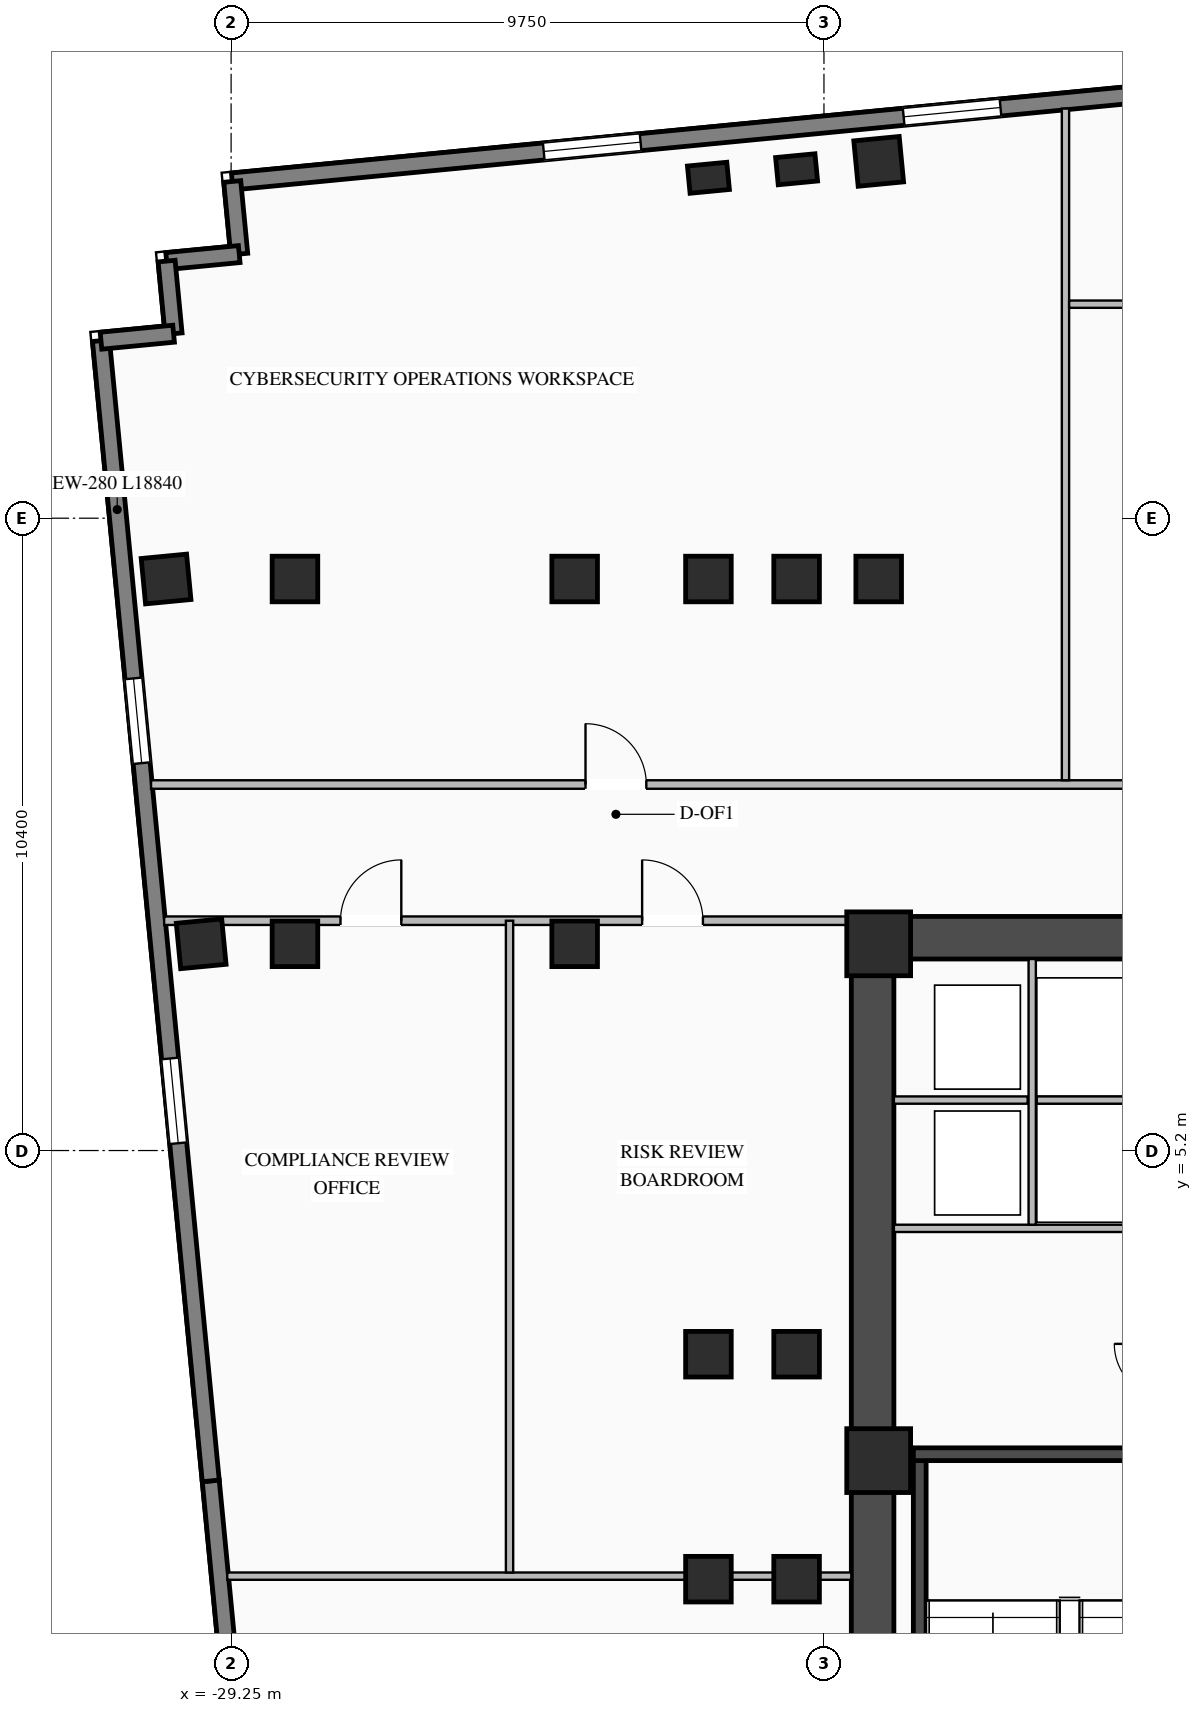
"""IFC4 building model, lengths in metres.
Left out: names, types, materials, properties, quantities, classifications, styles, units other than length and angle.
Written with IfcOpenShell. Run it as: python <this file> out.ifc"""

import sys

from ifc_helpers import new_model, si_unit, direction, frame, frame_2d, origin, origin_2d, place, context, subcontext, project, spatial, rectangle, i_section, extrude, element, fill, save


model = new_model("IFC4")
c1 = context("Model", 3, precision=1e-05, world=origin(), true_north=direction((0.0, 1.0)))
c2 = subcontext(c1, "Body", "Model", "MODEL_VIEW")
j1 = project(units=[si_unit("LENGTHUNIT", "METRE"), si_unit("PLANEANGLEUNIT", "RADIAN")], contexts=[c1])
p1 = place(None, origin())
s1 = spatial("IfcSite", under=j1, at=p1, CompositionType="ELEMENT")
p2 = place(p1, origin())
s2 = spatial("IfcBuilding", under=s1, at=p2, CompositionType="ELEMENT")
p3 = place(p2, frame((0.0, 0.0, 94.9)))
s3 = spatial("IfcBuildingStorey", under=s2, at=p3, CompositionType="ELEMENT", Elevation=94.9)
p4 = place(p3, frame((-19.05, 8.7, 0.0), z_axis=(0.0, 0.0, 1.0), x_axis=(1.0, 0.0, 0.0)))
e1 = element("IfcWall", 1, at=p4, inside=s3, PredefinedType="SHEAR", context=c2, shape_type="SweptSolid", body=[
    extrude(rectangle(XDim=10.25, YDim=0.7, at=frame_2d((5.125, 0.0))), origin(), (0.0, 0.0, 1.0), 3.27),
])
p5 = place(p4, frame((5.6, 0.0, 0.0)))
e2 = element("IfcOpeningElement", 2, at=p5, cuts=e1, PredefinedType="OPENING", context=c2, shape_type="SweptSolid", body=[
    extrude(rectangle(XDim=1.4, YDim=2.05, at=frame_2d((0.7, 1.025))), frame((0.0, 0.36, 0.0), z_axis=(0.0, -1.0, 0.0), x_axis=(1.0, 0.0, 0.0)), (0.0, 0.0, 1.0), 0.72),
])
p6 = place(p3, frame((-18.7, -8.35, 0.0), z_axis=(0.0, 0.0, 1.0), x_axis=(0.0, 1.0, 0.0)))
e3 = element("IfcWall", 3, at=p6, inside=s3, PredefinedType="SHEAR", context=c2, shape_type="SweptSolid", body=[
    extrude(rectangle(XDim=16.7, YDim=0.7, at=frame_2d((8.35, 0.0))), origin(), (0.0, 0.0, 1.0), 3.27),
])
p7 = place(p3, frame((-17.925, -8.1, 0.0), z_axis=(0.0, 0.0, 1.0), x_axis=(0.0, 1.0, 0.0)))
e4 = element("IfcWall", 4, at=p7, inside=s3, PredefinedType="SHEAR", context=c2, shape_type="SweptSolid", body=[
    extrude(rectangle(XDim=8.2, YDim=0.21, at=frame_2d((4.1, 0.0))), origin(), (0.0, 0.0, 1.0), 3.27),
])
p8 = place(p3, frame((-12.89, 0.205, 0.0), z_axis=(0.0, 0.0, 1.0), x_axis=(-1.0, 0.0, 0.0)))
e5 = element("IfcWall", 5, at=p8, inside=s3, PredefinedType="SHEAR", context=c2, shape_type="SweptSolid", body=[
    extrude(rectangle(XDim=5.14, YDim=0.21, at=frame_2d((2.57, 0.0))), origin(), (0.0, 0.0, 1.0), 3.27),
])
for number, where, z_axis, x_axis in (
    (6, (-18.6, 0.1, 0.0), (0.0, 0.0, 1.0), (1.0, 0.0, 0.0)),
    (7, (-18.6, 8.6, 0.0), (0.0, 0.0, 1.0), (1.0, 0.0, 0.0)),
):
    element("IfcColumn", number, at=place(p3, frame(where, z_axis=z_axis, x_axis=x_axis)), inside=s3, PredefinedType="COLUMN", context=c2, shape_type="SweptSolid", body=[
        extrude(rectangle(XDim=1.05, YDim=1.05, at=origin_2d()), origin(), (0.0, 0.0, 1.0), 3.45),
    ])
for number, where, z_axis, x_axis in (
    (8, (-21.4, 14.6, 0.0), (0.0, 0.0, 1.0), (1.0, 0.0, 0.0)),
    (9, (-19.95, 14.6, 0.0), (0.0, 0.0, 1.0), (1.0, 0.0, 0.0)),
    (10, (-18.6, 14.6, 0.0), (0.0, 0.0, 1.0), (1.0, 0.0, 0.0)),
    (11, (-21.4, -1.85, 0.0), (0.0, 0.0, 1.0), (1.0, 0.0, 0.0)),
    (12, (-21.4, 1.85, 0.0), (0.0, 0.0, 1.0), (1.0, 0.0, 0.0)),
    (13, (-19.95, -1.85, 0.0), (0.0, 0.0, 1.0), (1.0, 0.0, 0.0)),
    (14, (-19.95, 1.85, 0.0), (0.0, 0.0, 1.0), (1.0, 0.0, 0.0)),
    (15, (-23.6, 8.6, 0.0), (0.0, 0.0, 1.0), (1.0, 0.0, 0.0)),
    (16, (-23.6, 14.6, 0.0), (0.0, 0.0, 1.0), (1.0, 0.0, 0.0)),
    (17, (-28.2, 8.6, 0.0), (0.0, 0.0, 1.0), (1.0, 0.0, 0.0)),
    (18, (-28.2, 14.6, 0.0), (0.0, 0.0, 1.0), (1.0, 0.0, 0.0)),
    (19, (-18.6, 21.469, 0.0), (0.0, 0.0, 1.0), (0.995, 0.096, 0.0)),
    (20, (-29.742, 8.6, 0.0), (0.0, 0.0, 1.0), (0.995, 0.096, 0.0)),
    (21, (-30.32, 14.6, 0.0), (0.0, 0.0, 1.0), (0.995, 0.096, 0.0)),
):
    element("IfcColumn", number, at=place(p3, frame(where, z_axis=z_axis, x_axis=x_axis)), inside=s3, PredefinedType="COLUMN", context=c2, shape_type="SweptSolid", body=[
        extrude(i_section(OverallWidth=0.75, OverallDepth=0.75, WebThickness=0.03, FlangeThickness=0.044, at=origin_2d()), origin(), (0.0, 0.0, 1.0), 3.45),
    ])
for number, where, z_axis, x_axis in (
    (22, (-21.4, 21.199, 0.0), (0.0, 0.0, 1.0), (0.995, 0.096, 0.0)),
    (23, (-19.95, 21.339, 0.0), (0.0, 0.0, 1.0), (0.995, 0.096, 0.0)),
):
    element("IfcColumn", number, at=place(p3, frame(where, z_axis=z_axis, x_axis=x_axis)), inside=s3, PredefinedType="PILASTER", context=c2, shape_type="SweptSolid", body=[
        extrude(rectangle(XDim=0.65, YDim=0.45, at=origin_2d()), origin(), (0.0, 0.0, 1.0), 3.45),
    ])
p9 = place(p3, frame((-29.231, 21.138, 0.0), z_axis=(0.0, 0.0, 1.0), x_axis=(0.995395780835, 0.095850088663, 0.0)))
e24 = element("IfcWall", 24, at=p9, inside=s3, PredefinedType="STANDARD", context=c2, shape_type="SweptSolid", body=[
    extrude(rectangle(XDim=17.84, YDim=0.28, at=frame_2d((8.92, 0.0))), origin(), (0.0, 0.0, 1.0), 3.25),
])
p10 = place(p9, frame((5.147, 0.0, 0.76)))
e25 = element("IfcOpeningElement", 25, at=p10, cuts=e24, PredefinedType="OPENING", context=c2, shape_type="SweptSolid", body=[
    extrude(rectangle(XDim=1.6, YDim=1.95, at=frame_2d((0.8, 0.975))), frame((0.0, 0.15, 0.0), z_axis=(0.0, -1.0, 0.0), x_axis=(1.0, 0.0, 0.0)), (0.0, 0.0, 1.0), 0.3),
])
p11 = place(p9, frame((11.093, 0.0, 0.76)))
e26 = element("IfcOpeningElement", 26, at=p11, cuts=e24, PredefinedType="OPENING", context=c2, shape_type="SweptSolid", body=[
    extrude(rectangle(XDim=1.6, YDim=1.95, at=frame_2d((0.8, 0.975))), frame((0.0, 0.15, 0.0), z_axis=(0.0, -1.0, 0.0), x_axis=(1.0, 0.0, 0.0)), (0.0, 0.0, 1.0), 0.3),
])
p12 = place(p3, frame((-27.779, -18.987, 0.0), z_axis=(0.0, 0.0, 1.0), x_axis=(-0.095842534142, 0.995396508256, 0.0)))
e27 = element("IfcWall", 27, at=p12, inside=s3, PredefinedType="STANDARD", context=c2, shape_type="SweptSolid", body=[
    extrude(rectangle(XDim=18.84, YDim=0.28, at=frame_2d((9.42, 0.0))), origin(), (0.0, 0.0, 1.0), 3.25),
])
p13 = place(p12, frame((5.58, 0.0, 0.76)))
e28 = element("IfcOpeningElement", 28, at=p13, cuts=e27, PredefinedType="OPENING", context=c2, shape_type="SweptSolid", body=[
    extrude(rectangle(XDim=1.4, YDim=1.95, at=frame_2d((0.7, 0.975))), frame((0.0, 0.15, 0.0), z_axis=(0.0, -1.0, 0.0), x_axis=(1.0, 0.0, 0.0)), (0.0, 0.0, 1.0), 0.3),
])
p14 = place(p12, frame((11.86, 0.0, 0.76)))
e29 = element("IfcOpeningElement", 29, at=p14, cuts=e27, PredefinedType="OPENING", context=c2, shape_type="SweptSolid", body=[
    extrude(rectangle(XDim=1.4, YDim=1.95, at=frame_2d((0.7, 0.975))), frame((0.0, 0.15, 0.0), z_axis=(0.0, -1.0, 0.0), x_axis=(1.0, 0.0, 0.0)), (0.0, 0.0, 1.0), 0.3),
])
p15 = place(p3, frame((-29.585, -0.234, 0.0), z_axis=(0.0, 0.0, 1.0), x_axis=(-0.095841297881, 0.99539662729, 0.0)))
e30 = element("IfcWall", 30, at=p15, inside=s3, PredefinedType="STANDARD", context=c2, shape_type="SweptSolid", body=[
    extrude(rectangle(XDim=18.84, YDim=0.28, at=frame_2d((9.42, 0.0))), origin(), (0.0, 0.0, 1.0), 3.25),
])
p16 = place(p15, frame((5.58, 0.0, 0.76)))
e31 = element("IfcOpeningElement", 31, at=p16, cuts=e30, PredefinedType="OPENING", context=c2, shape_type="SweptSolid", body=[
    extrude(rectangle(XDim=1.4, YDim=1.95, at=frame_2d((0.7, 0.975))), frame((0.0, 0.15, 0.0), z_axis=(0.0, -1.0, 0.0), x_axis=(1.0, 0.0, 0.0)), (0.0, 0.0, 1.0), 0.3),
])
p17 = place(p15, frame((11.86, 0.0, 0.76)))
e32 = element("IfcOpeningElement", 32, at=p17, cuts=e30, PredefinedType="OPENING", context=c2, shape_type="SweptSolid", body=[
    extrude(rectangle(XDim=1.4, YDim=1.95, at=frame_2d((0.7, 0.975))), frame((0.0, 0.15, 0.0), z_axis=(0.0, -1.0, 0.0), x_axis=(1.0, 0.0, 0.0)), (0.0, 0.0, 1.0), 0.3),
])
for number, where, z_axis, x_axis in (
    (33, (-29.231, 21.138, 0.0), (0.0, 0.0, 1.0), (0.096, -0.995, 0.0)),
    (34, (-29.116, 19.944, 0.0), (0.0, 0.0, 1.0), (-0.995, -0.096, 0.0)),
):
    element("IfcWall", number, at=place(p3, frame(where, z_axis=z_axis, x_axis=x_axis)), inside=s3, PredefinedType="STANDARD", context=c2, shape_type="SweptSolid", body=[
        extrude(rectangle(XDim=1.2, YDim=0.28, at=frame_2d((0.6, 0.0))), origin(), (0.0, 0.0, 1.0), 3.25),
    ])
for number, where, z_axis, x_axis in (
    (35, (-30.311, 19.829, 0.0), (0.0, 0.0, 1.0), (0.096, -0.995, 0.0)),
    (36, (-30.196, 18.635, 0.0), (0.0, 0.0, 1.0), (-0.995, -0.096, 0.0)),
):
    element("IfcWall", number, at=place(p3, frame(where, z_axis=z_axis, x_axis=x_axis)), inside=s3, PredefinedType="STANDARD", context=c2, shape_type="SweptSolid", body=[
        extrude(rectangle(XDim=1.2, YDim=0.28, at=frame_2d((0.6, 0.0))), origin(), (0.0, 0.0, 1.0), 3.25),
    ])
p18 = place(p3, frame((-18.35, 3.92, 0.0), z_axis=(0.0, 0.0, 1.0), x_axis=(1.0, 0.0, 0.0)))
e37 = element("IfcWall", 37, at=p18, inside=s3, PredefinedType="STANDARD", context=c2, shape_type="SweptSolid", body=[
    extrude(rectangle(XDim=4.45, YDim=0.12, at=frame_2d((2.225, 0.0))), origin(), (0.0, 0.0, 1.0), 3.25),
])
p19 = place(p3, frame((-18.35, 6.03, 0.0), z_axis=(0.0, 0.0, 1.0), x_axis=(1.0, 0.0, 0.0)))
e38 = element("IfcWall", 38, at=p19, inside=s3, PredefinedType="STANDARD", context=c2, shape_type="SweptSolid", body=[
    extrude(rectangle(XDim=2.2, YDim=0.12, at=frame_2d((1.1, 0.0))), origin(), (0.0, 0.0, 1.0), 3.25),
])
p20 = place(p3, frame((-16.075, 3.98, 0.0), z_axis=(0.0, 0.0, 1.0), x_axis=(0.0, 1.0, 0.0)))
e39 = element("IfcWall", 39, at=p20, inside=s3, PredefinedType="STANDARD", context=c2, shape_type="SweptSolid", body=[
    extrude(rectangle(XDim=4.37, YDim=0.12, at=frame_2d((2.185, 0.0))), origin(), (0.0, 0.0, 1.0), 3.25),
])
p21 = place(p3, frame((-16.0, 6.03, 0.0), z_axis=(0.0, 0.0, 1.0), x_axis=(1.0, 0.0, 0.0)))
e40 = element("IfcWall", 40, at=p21, inside=s3, PredefinedType="STANDARD", context=c2, shape_type="SweptSolid", body=[
    extrude(rectangle(XDim=2.1, YDim=0.12, at=frame_2d((1.05, 0.0))), origin(), (0.0, 0.0, 1.0), 3.25),
])
p22 = place(p3, frame((-30.567, 11.22, 0.0), z_axis=(0.0, 0.0, 1.0), x_axis=(1.0, 0.0, 0.0)))
e41 = element("IfcWall", 41, at=p22, inside=s3, PredefinedType="STANDARD", context=c2, shape_type="SweptSolid", body=[
    extrude(rectangle(XDim=67.551, YDim=0.14, at=frame_2d((33.775, 0.0))), origin(), (0.0, 0.0, 1.0), 3.25),
])
p23 = place(p22, frame((7.146, 0.0, 0.0)))
e42 = element("IfcOpeningElement", 42, at=p23, cuts=e41, PredefinedType="OPENING", context=c2, shape_type="SweptSolid", body=[
    extrude(rectangle(XDim=1.0, YDim=2.08, at=frame_2d((0.5, 1.04))), frame((0.0, 0.08, 0.0), z_axis=(0.0, -1.0, 0.0), x_axis=(1.0, 0.0, 0.0)), (0.0, 0.0, 1.0), 0.16),
])
p24 = place(p22, frame((23.734, 0.0, 0.0)))
e43 = element("IfcOpeningElement", 43, at=p24, cuts=e41, PredefinedType="OPENING", context=c2, shape_type="SweptSolid", body=[
    extrude(rectangle(XDim=1.0, YDim=2.08, at=frame_2d((0.5, 1.04))), frame((0.0, 0.08, 0.0), z_axis=(0.0, -1.0, 0.0), x_axis=(1.0, 0.0, 0.0)), (0.0, 0.0, 1.0), 0.16),
])
p25 = place(p22, frame((42.124, 0.0, 0.0)))
e44 = element("IfcOpeningElement", 44, at=p25, cuts=e41, PredefinedType="OPENING", context=c2, shape_type="SweptSolid", body=[
    extrude(rectangle(XDim=1.0, YDim=2.08, at=frame_2d((0.5, 1.04))), frame((0.0, 0.08, 0.0), z_axis=(0.0, -1.0, 0.0), x_axis=(1.0, 0.0, 0.0)), (0.0, 0.0, 1.0), 0.16),
])
p26 = place(p22, frame((59.059, 0.0, 0.0)))
e45 = element("IfcOpeningElement", 45, at=p26, cuts=e41, PredefinedType="OPENING", context=c2, shape_type="SweptSolid", body=[
    extrude(rectangle(XDim=1.0, YDim=2.08, at=frame_2d((0.5, 1.04))), frame((0.0, 0.08, 0.0), z_axis=(0.0, -1.0, 0.0), x_axis=(1.0, 0.0, 0.0)), (0.0, 0.0, 1.0), 0.16),
])
p27 = place(p3, frame((-15.528, 11.29, 0.0), z_axis=(0.0, 0.0, 1.0), x_axis=(0.0, 1.0, 0.0)))
e46 = element("IfcWall", 46, at=p27, inside=s3, PredefinedType="STANDARD", context=c2, shape_type="SweptSolid", body=[
    extrude(rectangle(XDim=11.047, YDim=0.12, at=frame_2d((5.524, 0.0))), origin(), (0.0, 0.0, 1.0), 3.25),
])
p28 = place(p3, frame((-15.468, 19.12, 0.0), z_axis=(0.0, 0.0, 1.0), x_axis=(1.0, 0.0, 0.0)))
e47 = element("IfcWall", 47, at=p28, inside=s3, PredefinedType="STANDARD", context=c2, shape_type="SweptSolid", body=[
    extrude(rectangle(XDim=36.659, YDim=0.12, at=frame_2d((18.33, 0.0))), origin(), (0.0, 0.0, 1.0), 3.25),
])
p29 = place(p28, frame((8.792, 0.0, 0.0)))
e48 = element("IfcOpeningElement", 48, at=p29, cuts=e47, PredefinedType="OPENING", context=c2, shape_type="SweptSolid", body=[
    extrude(rectangle(XDim=1.0, YDim=2.08, at=frame_2d((0.5, 1.04))), frame((0.0, 0.07, 0.0), z_axis=(0.0, -1.0, 0.0), x_axis=(1.0, 0.0, 0.0)), (0.0, 0.0, 1.0), 0.14),
])
p30 = place(p28, frame((26.867, 0.0, 0.0)))
e49 = element("IfcOpeningElement", 49, at=p30, cuts=e47, PredefinedType="OPENING", context=c2, shape_type="SweptSolid", body=[
    extrude(rectangle(XDim=1.0, YDim=2.08, at=frame_2d((0.5, 1.04))), frame((0.0, 0.07, 0.0), z_axis=(0.0, -1.0, 0.0), x_axis=(1.0, 0.0, 0.0)), (0.0, 0.0, 1.0), 0.14),
])
p31 = place(p3, frame((-30.351, 8.98, 0.0), z_axis=(0.0, 0.0, 1.0), x_axis=(1.0, 0.0, 0.0)))
e50 = element("IfcWall", 50, at=p31, inside=s3, PredefinedType="STANDARD", context=c2, shape_type="SweptSolid", body=[
    extrude(rectangle(XDim=11.301, YDim=0.14, at=frame_2d((5.651, 0.0))), origin(), (0.0, 0.0, 1.0), 3.25),
])
p32 = place(p31, frame((2.9, 0.0, 0.0)))
e51 = element("IfcOpeningElement", 51, at=p32, cuts=e50, PredefinedType="OPENING", context=c2, shape_type="SweptSolid", body=[
    extrude(rectangle(XDim=1.0, YDim=2.08, at=frame_2d((0.5, 1.04))), frame((0.0, 0.08, 0.0), z_axis=(0.0, -1.0, 0.0), x_axis=(1.0, 0.0, 0.0)), (0.0, 0.0, 1.0), 0.16),
])
p33 = place(p31, frame((7.861, 0.0, 0.0)))
e52 = element("IfcOpeningElement", 52, at=p33, cuts=e50, PredefinedType="OPENING", context=c2, shape_type="SweptSolid", body=[
    extrude(rectangle(XDim=1.0, YDim=2.08, at=frame_2d((0.5, 1.04))), frame((0.0, 0.08, 0.0), z_axis=(0.0, -1.0, 0.0), x_axis=(1.0, 0.0, 0.0)), (0.0, 0.0, 1.0), 0.16),
])
p34 = place(p3, frame((-29.313, -1.8, 0.0), z_axis=(0.0, 0.0, 1.0), x_axis=(1.0, 0.0, 0.0)))
e53 = element("IfcWall", 53, at=p34, inside=s3, PredefinedType="STANDARD", context=c2, shape_type="SweptSolid", body=[
    extrude(rectangle(XDim=10.263, YDim=0.12, at=frame_2d((5.132, 0.0))), origin(), (0.0, 0.0, 1.0), 3.25),
])
p35 = place(p3, frame((-24.671, -1.74, 0.0), z_axis=(0.0, 0.0, 1.0), x_axis=(0.0, 1.0, 0.0)))
e54 = element("IfcWall", 54, at=p35, inside=s3, PredefinedType="STANDARD", context=c2, shape_type="SweptSolid", body=[
    extrude(rectangle(XDim=10.72, YDim=0.12, at=frame_2d((5.36, 0.0))), origin(), (0.0, 0.0, 1.0), 3.25),
])
p36 = place(p10, origin())
e55 = element("IfcWindow", 55, at=p36, inside=s3, PartitioningType="SINGLE_PANEL", PredefinedType="WINDOW", context=c2, shape_type="SweptSolid", body=[
    extrude(rectangle(XDim=1.6, YDim=1.95, at=frame_2d((0.8, 0.975))), frame((0.0, 0.03, 0.0), z_axis=(0.0, -1.0, 0.0), x_axis=(1.0, 0.0, 0.0)), (0.0, 0.0, 1.0), 0.06),
])
fill(e25, e55)
p37 = place(p11, origin())
e56 = element("IfcWindow", 56, at=p37, inside=s3, PartitioningType="SINGLE_PANEL", PredefinedType="WINDOW", context=c2, shape_type="SweptSolid", body=[
    extrude(rectangle(XDim=1.6, YDim=1.95, at=frame_2d((0.8, 0.975))), frame((0.0, 0.03, 0.0), z_axis=(0.0, -1.0, 0.0), x_axis=(1.0, 0.0, 0.0)), (0.0, 0.0, 1.0), 0.06),
])
fill(e26, e56)
p38 = place(p16, origin())
e57 = element("IfcWindow", 57, at=p38, inside=s3, PartitioningType="SINGLE_PANEL", PredefinedType="WINDOW", context=c2, shape_type="SweptSolid", body=[
    extrude(rectangle(XDim=1.4, YDim=1.95, at=frame_2d((0.7, 0.975))), frame((0.0, 0.03, 0.0), z_axis=(0.0, -1.0, 0.0), x_axis=(1.0, 0.0, 0.0)), (0.0, 0.0, 1.0), 0.06),
])
fill(e31, e57)
p39 = place(p17, origin())
e58 = element("IfcWindow", 58, at=p39, inside=s3, PartitioningType="SINGLE_PANEL", PredefinedType="WINDOW", context=c2, shape_type="SweptSolid", body=[
    extrude(rectangle(XDim=1.4, YDim=1.95, at=frame_2d((0.7, 0.975))), frame((0.0, 0.03, 0.0), z_axis=(0.0, -1.0, 0.0), x_axis=(1.0, 0.0, 0.0)), (0.0, 0.0, 1.0), 0.06),
])
fill(e32, e58)
p40 = place(p23, origin())
e59 = element("IfcDoor", 59, at=p40, inside=s3, OperationType="SINGLE_SWING_LEFT", PredefinedType="DOOR", context=c2, shape_type="SweptSolid", body=[
    extrude(rectangle(XDim=1.0, YDim=2.08, at=frame_2d((0.5, 1.04))), frame((0.0, 0.025, 0.0), z_axis=(0.0, -1.0, 0.0), x_axis=(1.0, 0.0, 0.0)), (0.0, 0.0, 1.0), 0.05),
])
fill(e42, e59)
p41 = place(p32, origin())
e60 = element("IfcDoor", 60, at=p41, inside=s3, OperationType="SINGLE_SWING_RIGHT", PredefinedType="DOOR", context=c2, shape_type="SweptSolid", body=[
    extrude(rectangle(XDim=1.0, YDim=2.08, at=frame_2d((0.5, 1.04))), frame((0.0, 0.025, 0.0), z_axis=(0.0, -1.0, 0.0), x_axis=(1.0, 0.0, 0.0)), (0.0, 0.0, 1.0), 0.05),
])
fill(e51, e60)
p42 = place(p33, origin())
e61 = element("IfcDoor", 61, at=p42, inside=s3, OperationType="SINGLE_SWING_LEFT", PredefinedType="DOOR", context=c2, shape_type="SweptSolid", body=[
    extrude(rectangle(XDim=1.0, YDim=2.08, at=frame_2d((0.5, 1.04))), frame((0.0, 0.025, 0.0), z_axis=(0.0, -1.0, 0.0), x_axis=(1.0, 0.0, 0.0)), (0.0, 0.0, 1.0), 0.05),
])
fill(e52, e61)
save(model, sys.argv[1])
